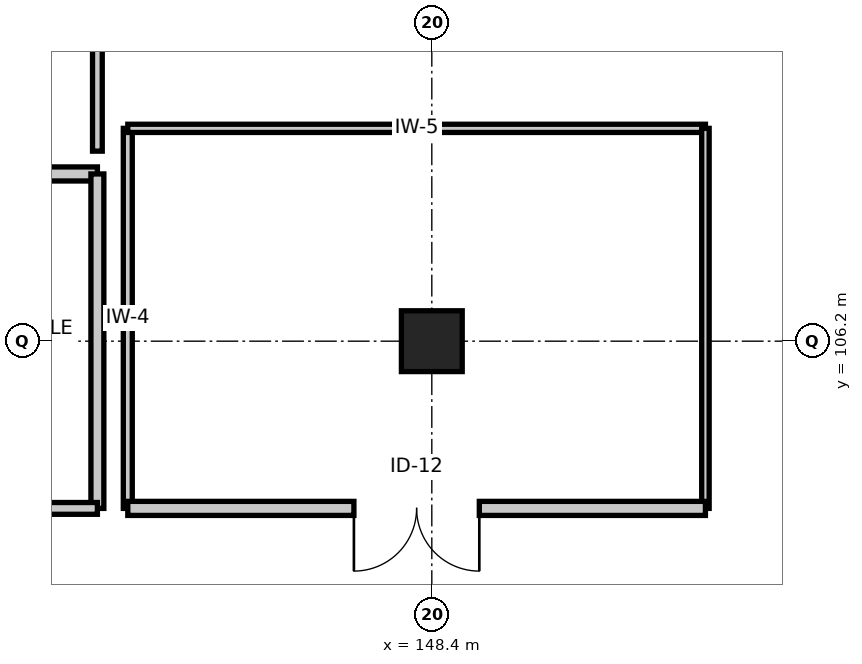
"""IFC4 building model, lengths in metres.
Left out: names, types, materials, properties, quantities, classifications, styles, units other than length and angle.
Written with IfcOpenShell. Run it as: python <this file> out.ifc"""

import sys

from ifc_helpers import new_model, si_unit, direction, frame, frame_2d, origin, origin_2d, place, context, subcontext, project, spatial, rectangle, extrude, element, fill, save


model = new_model("IFC4")
c1 = context("Model", 3, precision=1e-05, world=origin(), true_north=direction((0.0, 1.0)))
c2 = subcontext(c1, "Body", "Model", "MODEL_VIEW")
j1 = project(units=[si_unit("LENGTHUNIT", "METRE"), si_unit("PLANEANGLEUNIT", "RADIAN")], contexts=[c1])
p1 = place(None, origin())
s1 = spatial("IfcSite", under=j1, at=p1, CompositionType="ELEMENT")
p2 = place(p1, origin())
s2 = spatial("IfcBuilding", under=s1, at=p2, CompositionType="ELEMENT")
p3 = place(p2, frame((0.0, 0.0, -4.5)))
s3 = spatial("IfcBuildingStorey", under=s2, at=p3, CompositionType="ELEMENT", Elevation=-4.5)
p4 = place(p3, frame((148.4, 106.2, 0.0), z_axis=(0.0, 0.0, 1.0), x_axis=(1.0, 0.0, 0.0)))
e1 = element("IfcColumn", 1, at=p4, inside=s3, PredefinedType="COLUMN", context=c2, shape_type="SweptSolid", body=[
    extrude(rectangle(XDim=0.8, YDim=0.8, at=origin_2d()), origin(), (0.0, 0.0, 1.0), 4.5),
])
p5 = place(p3, frame((136.4, 108.4, 0.0), z_axis=(0.0, 0.0, 1.0), x_axis=(1.0, 0.0, 0.0)))
e2 = element("IfcWall", 2, at=p5, inside=s3, PredefinedType="PARTITIONING", context=c2, shape_type="SweptSolid", body=[
    extrude(rectangle(XDim=7.6, YDim=0.185, at=frame_2d((3.8, 0.0))), origin(), (0.0, 0.0, 1.0), 3.335),
])
p6 = place(p3, frame((144.0, 108.4, 0.0), z_axis=(0.0, 0.0, 1.0), x_axis=(0.0, -1.0, 0.0)))
e3 = element("IfcWall", 3, at=p6, inside=s3, PredefinedType="PARTITIONING", context=c2, shape_type="SweptSolid", body=[
    extrude(rectangle(XDim=4.4, YDim=0.17, at=frame_2d((2.2, 0.0))), origin(), (0.0, 0.0, 1.0), 3.435),
])
p7 = place(p3, frame((144.0, 104.0, 0.0), z_axis=(0.0, 0.0, 1.0), x_axis=(-1.0, 0.0, 0.0)))
e4 = element("IfcWall", 4, at=p7, inside=s3, PredefinedType="PARTITIONING", context=c2, shape_type="SweptSolid", body=[
    extrude(rectangle(XDim=7.6, YDim=0.155, at=frame_2d((3.8, 0.0))), origin(), (0.0, 0.0, 1.0), 3.335),
])
p8 = place(p7, frame((3.02, 0.0, 0.0)))
e5 = element("IfcOpeningElement", 5, at=p8, cuts=e4, PredefinedType="OPENING", context=c2, shape_type="SweptSolid", body=[
    extrude(rectangle(XDim=1.56, YDim=2.26, at=frame_2d((0.78, 1.13))), frame((0.0, 0.087, 0.0), z_axis=(0.0, -1.0, 0.0), x_axis=(1.0, 0.0, 0.0)), (0.0, 0.0, 1.0), 0.175),
])
p9 = place(p3, frame((144.0, 113.0, 0.0), z_axis=(0.0, 0.0, 1.0), x_axis=(0.0, -1.0, 0.0)))
e6 = element("IfcWall", 6, at=p9, inside=s3, PredefinedType="PARTITIONING", context=c2, shape_type="SweptSolid", body=[
    extrude(rectangle(XDim=4.3, YDim=0.128, at=frame_2d((2.15, 0.0))), origin(), (0.0, 0.0, 1.0), 3.827),
])
p10 = place(p9, frame((1.4, 0.0, 0.0)))
e7 = element("IfcOpeningElement", 7, at=p10, cuts=e6, PredefinedType="OPENING", context=c2, shape_type="SweptSolid", body=[
    extrude(rectangle(XDim=1.5, YDim=2.2, at=frame_2d((0.75, 1.1))), frame((0.0, 0.074, 0.0), z_axis=(0.0, -1.0, 0.0), x_axis=(1.0, 0.0, 0.0)), (0.0, 0.0, 1.0), 0.148),
])
p11 = place(p3, frame((144.4, 104.0, 0.0), z_axis=(0.0, 0.0, 1.0), x_axis=(0.0, 1.0, 0.0)))
e8 = element("IfcWall", 8, at=p11, inside=s3, PredefinedType="PARTITIONING", context=c2, shape_type="SweptSolid", body=[
    extrude(rectangle(XDim=5.0, YDim=0.118, at=frame_2d((2.5, 0.0))), origin(), (0.0, 0.0, 1.0), 3.435),
])
p12 = place(p3, frame((144.4, 109.0, 0.0), z_axis=(0.0, 0.0, 1.0), x_axis=(1.0, 0.0, 0.0)))
e9 = element("IfcWall", 9, at=p12, inside=s3, PredefinedType="PARTITIONING", context=c2, shape_type="SweptSolid", body=[
    extrude(rectangle(XDim=7.6, YDim=0.108, at=frame_2d((3.8, 0.0))), origin(), (0.0, 0.0, 1.0), 3.335),
])
p13 = place(p3, frame((152.0, 109.0, 0.0), z_axis=(0.0, 0.0, 1.0), x_axis=(0.0, -1.0, 0.0)))
e10 = element("IfcWall", 10, at=p13, inside=s3, PredefinedType="PARTITIONING", context=c2, shape_type="SweptSolid", body=[
    extrude(rectangle(XDim=5.0, YDim=0.098, at=frame_2d((2.5, 0.0))), origin(), (0.0, 0.0, 1.0), 3.435),
])
p14 = place(p3, frame((152.0, 104.0, 0.0), z_axis=(0.0, 0.0, 1.0), x_axis=(-1.0, 0.0, 0.0)))
e11 = element("IfcWall", 11, at=p14, inside=s3, PredefinedType="PARTITIONING", context=c2, shape_type="SweptSolid", body=[
    extrude(rectangle(XDim=7.6, YDim=0.185, at=frame_2d((3.8, 0.0))), origin(), (0.0, 0.0, 1.0), 3.335),
])
p15 = place(p14, frame((2.975, 0.0, 0.0)))
e12 = element("IfcOpeningElement", 12, at=p15, cuts=e11, PredefinedType="OPENING", context=c2, shape_type="SweptSolid", body=[
    extrude(rectangle(XDim=1.65, YDim=2.25, at=frame_2d((0.825, 1.125))), frame((0.0, 0.103, 0.0), z_axis=(0.0, -1.0, 0.0), x_axis=(1.0, 0.0, 0.0)), (0.0, 0.0, 1.0), 0.205),
])
p16 = place(p15, origin())
e13 = element("IfcDoor", 13, at=p16, inside=s3, OperationType="DOUBLE_DOOR_SINGLE_SWING", PredefinedType="DOOR", context=c2, shape_type="SweptSolid", body=[
    extrude(rectangle(XDim=1.65, YDim=2.25, at=frame_2d((0.825, 1.125))), frame((0.0, 0.025, 0.0), z_axis=(0.0, -1.0, 0.0), x_axis=(1.0, 0.0, 0.0)), (0.0, 0.0, 1.0), 0.05),
])
fill(e12, e13)
save(model, sys.argv[1])
